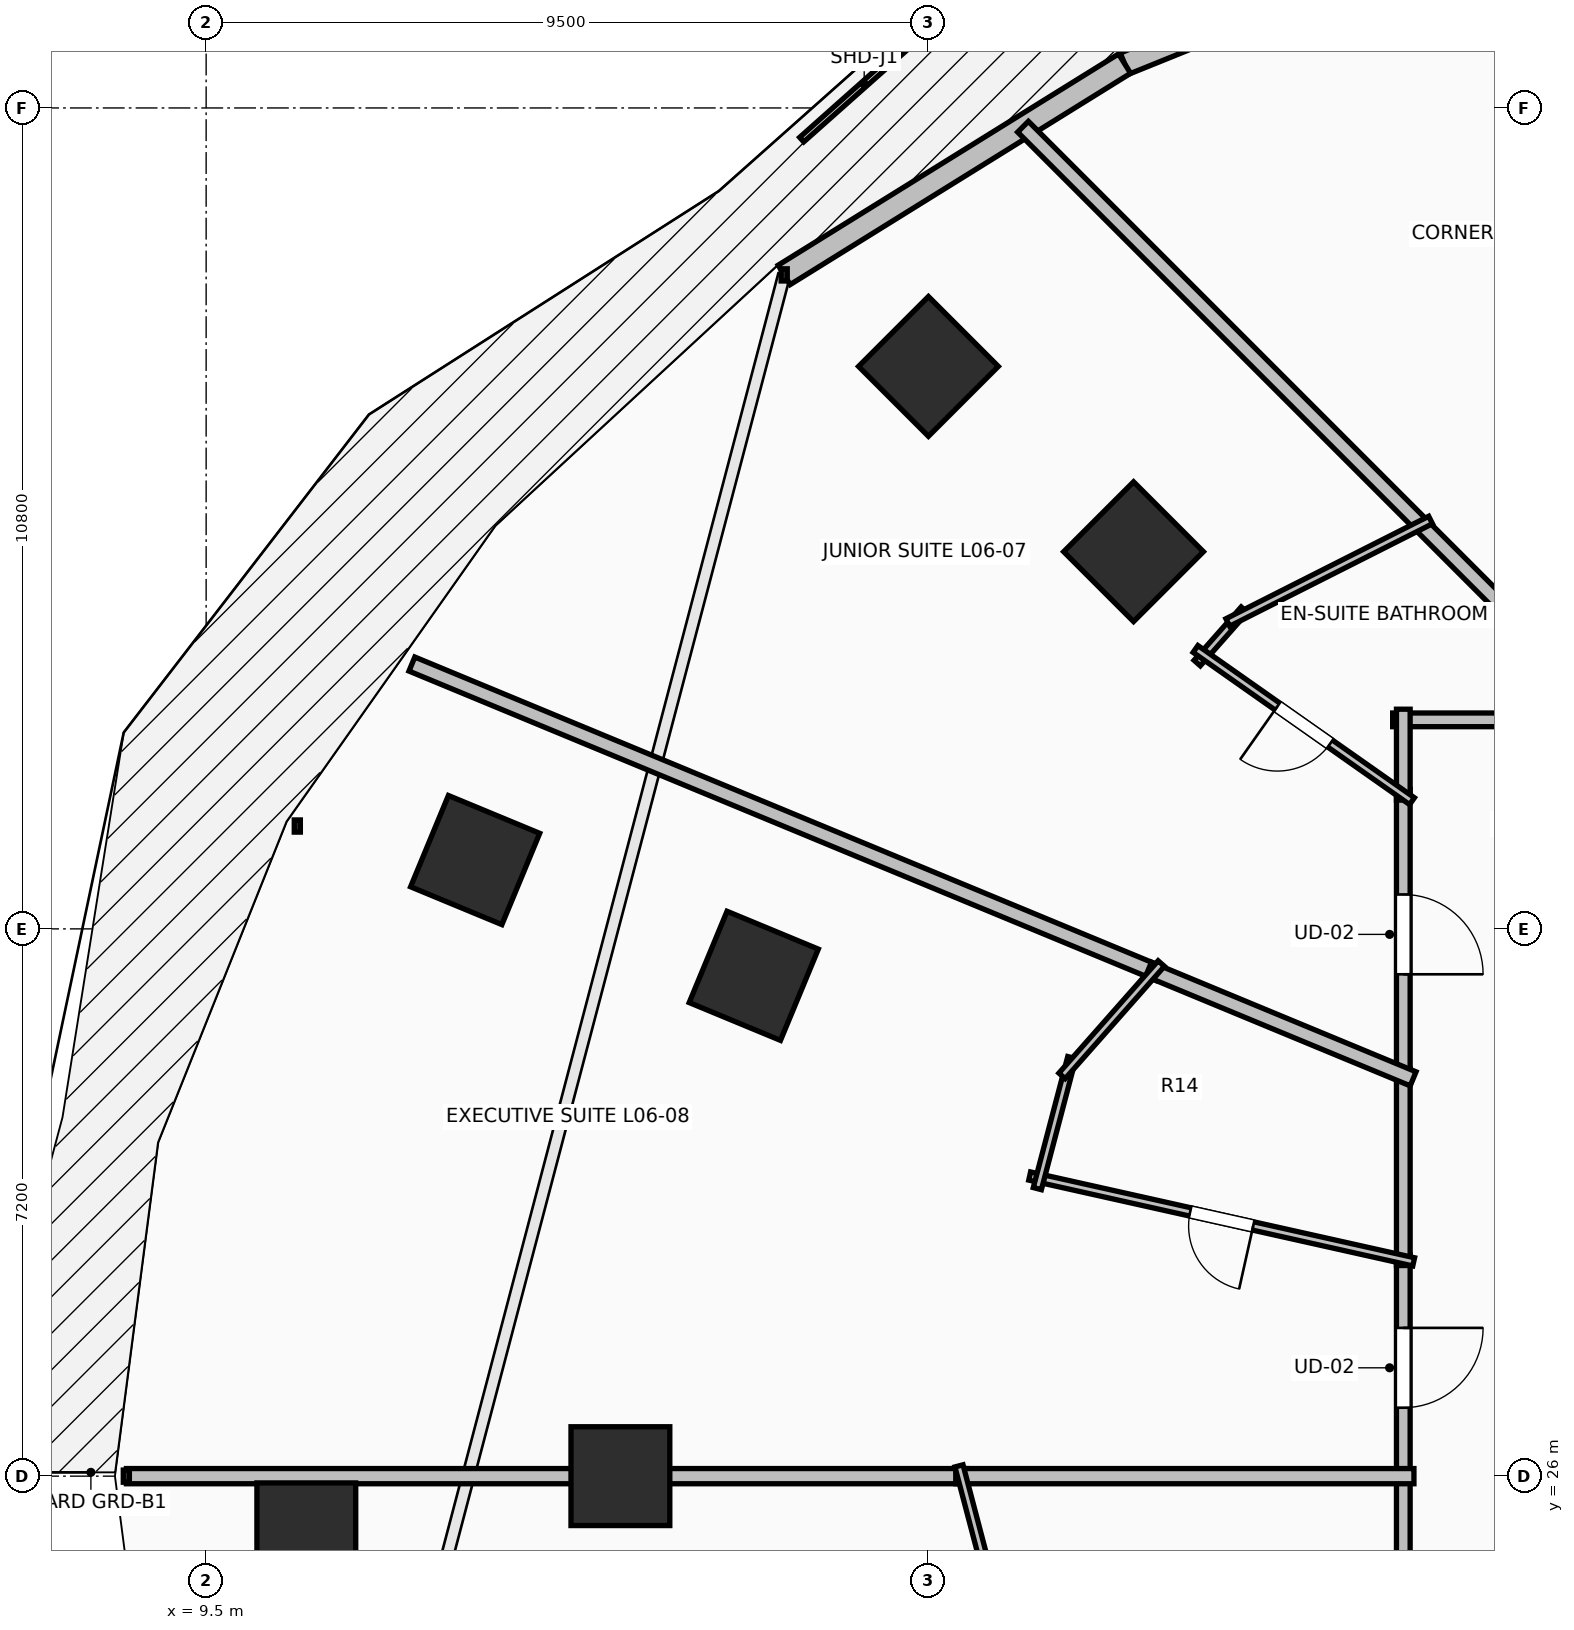
"""IFC4 building model, lengths in metres.
Left out: names, types, materials, properties, quantities, classifications, styles, units other than length and angle.
Written with IfcOpenShell. Run it as: python <this file> out.ifc"""

import sys

from ifc_helpers import new_model, si_unit, direction, frame, frame_2d, origin, origin_2d, place, context, subcontext, project, spatial, rectangle, extrude, element, fill, save


model = new_model("IFC4")
c1 = context("Model", 3, precision=1e-05, world=origin(), true_north=direction((0.0, 1.0)))
c2 = subcontext(c1, "Body", "Model", "MODEL_VIEW")
j1 = project(units=[si_unit("LENGTHUNIT", "METRE"), si_unit("PLANEANGLEUNIT", "RADIAN")], contexts=[c1])
p1 = place(None, origin())
s1 = spatial("IfcSite", under=j1, at=p1, CompositionType="ELEMENT")
p2 = place(p1, origin())
s2 = spatial("IfcBuilding", under=s1, at=p2, CompositionType="ELEMENT")
p3 = place(p2, frame((0.0, 0.0, 27.5)))
s3 = spatial("IfcBuildingStorey", under=s2, at=p3, CompositionType="ELEMENT", Elevation=27.5)
for number, where, z_axis, x_axis in (
    (1, (21.701, 38.162, 0.0), (0.0, 0.0, 1.0), (-0.707, 0.707, 0.0)),
    (2, (16.705, 32.582, 0.0), (0.0, 0.0, 1.0), (-0.924, 0.383, 0.0)),
    (3, (14.95, 26.0, 0.0), (0.0, 0.0, 1.0), (-1.0, 0.0, 0.0)),
    (4, (19.003, 40.6, 0.0), (0.0, 0.0, 1.0), (-0.707, 0.707, 0.0)),
    (5, (13.039, 34.105, 0.0), (0.0, 0.0, 1.0), (-0.924, 0.383, 0.0)),
    (6, (10.818, 25.261, 0.0), (0.0, 0.0, 1.0), (-1.0, 0.0, 0.0)),
):
    element("IfcColumn", number, at=place(p3, frame(where, z_axis=z_axis, x_axis=x_axis)), inside=s3, PredefinedType="COLUMN", context=c2, shape_type="SweptSolid", body=[
        extrude(rectangle(XDim=1.3, YDim=1.3, at=origin_2d()), origin(), (0.0, 0.0, 1.0), 3.5),
    ])
p4 = place(p3, frame((26.692, 46.649, 0.0), z_axis=(0.0, 0.0, 1.0), x_axis=(-0.927095325176, -0.374825636845, 0.0)))
e7 = element("IfcWall", 7, at=p4, inside=s3, PredefinedType="STANDARD", context=c2, shape_type="SweptSolid", body=[
    extrude(rectangle(XDim=5.51, YDim=0.3, at=frame_2d((2.755, 0.0))), origin(), (0.0, 0.0, 1.0), 3.24),
])
p5 = place(p4, frame((1.955, 0.0, 0.0)))
e8 = element("IfcOpeningElement", 8, at=p5, cuts=e7, PredefinedType="OPENING", context=c2, shape_type="SweptSolid", body=[
    extrude(rectangle(XDim=1.6, YDim=2.3, at=frame_2d((0.8, 1.15))), frame((0.0, 0.165, 0.0), z_axis=(0.0, -1.0, 0.0), x_axis=(1.0, 0.0, 0.0)), (0.0, 0.0, 1.0), 0.33),
])
p6 = place(p3, frame((21.583, 44.583, 0.0), z_axis=(0.0, 0.0, 1.0), x_axis=(-0.849633724826, -0.527373239404, 0.0)))
e9 = element("IfcWall", 9, at=p6, inside=s3, PredefinedType="STANDARD", context=c2, shape_type="SweptSolid", body=[
    extrude(rectangle(XDim=5.271, YDim=0.3, at=frame_2d((2.635, 0.0))), origin(), (0.0, 0.0, 1.0), 3.24),
])
p7 = place(p3, frame((25.25, 35.034, 0.0), z_axis=(0.0, 0.0, 1.0), x_axis=(0.0, -1.0, 0.0)))
e10 = element("IfcWall", 10, at=p7, inside=s3, PredefinedType="PARTITIONING", context=c2, shape_type="SweptSolid", body=[
    extrude(rectangle(XDim=3.813, YDim=0.18, at=frame_2d((1.906, 0.0))), origin(), (0.0, 0.0, 1.0), 2.432),
])
p8 = place(p7, frame((1.382, 0.0, 0.0)))
e11 = element("IfcOpeningElement", 11, at=p8, cuts=e10, PredefinedType="OPENING", context=c2, shape_type="SweptSolid", body=[
    extrude(rectangle(XDim=1.05, YDim=2.2, at=frame_2d((0.525, 1.1))), frame((0.0, 0.105, 0.0), z_axis=(0.0, -1.0, 0.0), x_axis=(1.0, 0.0, 0.0)), (0.0, 0.0, 1.0), 0.21),
])
p9 = place(p3, frame((28.105, 35.95, 0.0), z_axis=(0.0, 0.0, 1.0), x_axis=(-1.0, 0.0, 0.0)))
e12 = element("IfcWall", 12, at=p9, inside=s3, PredefinedType="PARTITIONING", context=c2, shape_type="SweptSolid", body=[
    extrude(rectangle(XDim=2.995, YDim=0.18, at=frame_2d((1.498, 0.0))), origin(), (0.0, 0.0, 1.0), 2.432),
])
p10 = place(p3, frame((25.25, 36.09, 0.0), z_axis=(0.0, 0.0, 1.0), x_axis=(0.0, -1.0, 0.0)))
e13 = element("IfcWall", 13, at=p10, inside=s3, PredefinedType="PARTITIONING", context=c2, shape_type="SweptSolid", body=[
    extrude(rectangle(XDim=1.196, YDim=0.18, at=frame_2d((0.598, 0.0))), origin(), (0.0, 0.0, 1.0), 2.432),
])
p11 = place(p3, frame((25.25, 28.911, 0.0), z_axis=(0.0, 0.0, 1.0), x_axis=(0.0, -1.0, 0.0)))
e14 = element("IfcWall", 14, at=p11, inside=s3, PredefinedType="PARTITIONING", context=c2, shape_type="SweptSolid", body=[
    extrude(rectangle(XDim=2.971, YDim=0.18, at=frame_2d((1.485, 0.0))), origin(), (0.0, 0.0, 1.0), 2.432),
])
p12 = place(p11, frame((0.96, 0.0, 0.0)))
e15 = element("IfcOpeningElement", 15, at=p12, cuts=e14, PredefinedType="OPENING", context=c2, shape_type="SweptSolid", body=[
    extrude(rectangle(XDim=1.05, YDim=2.2, at=frame_2d((0.525, 1.1))), frame((0.0, 0.105, 0.0), z_axis=(0.0, -1.0, 0.0), x_axis=(1.0, 0.0, 0.0)), (0.0, 0.0, 1.0), 0.21),
])
p13 = place(p3, frame((25.25, 31.361, 0.0), z_axis=(0.0, 0.0, 1.0), x_axis=(0.0, -1.0, 0.0)))
e16 = element("IfcWall", 16, at=p13, inside=s3, PredefinedType="PARTITIONING", context=c2, shape_type="SweptSolid", body=[
    extrude(rectangle(XDim=2.59, YDim=0.18, at=frame_2d((1.295, 0.0))), origin(), (0.0, 0.0, 1.0), 2.432),
])
p14 = place(p3, frame((25.25, 26.08, 0.0), z_axis=(0.0, 0.0, 1.0), x_axis=(0.0, -1.0, 0.0)))
e17 = element("IfcWall", 17, at=p14, inside=s3, PredefinedType="PARTITIONING", context=c2, shape_type="SweptSolid", body=[
    extrude(rectangle(XDim=2.385, YDim=0.18, at=frame_2d((1.192, 0.0))), origin(), (0.0, 0.0, 1.0), 3.24),
])
p15 = place(p3, frame((20.247, 43.753, 0.0), z_axis=(0.0, 0.0, 1.0), x_axis=(0.707106781187, -0.707106781187, 0.0)))
e18 = element("IfcWall", 18, at=p15, inside=s3, PredefinedType="PARTITIONING", context=c2, shape_type="SweptSolid", body=[
    extrude(rectangle(XDim=11.035, YDim=0.2, at=frame_2d((5.518, 0.0))), origin(), (0.0, 0.0, 1.0), 2.432),
])
p16 = place(p3, frame((22.538, 36.697, 0.0), z_axis=(0.0, 0.0, 1.0), x_axis=(0.662242037053, 0.749289986827, 0.0)))
e19 = element("IfcWall", 19, at=p16, inside=s3, PredefinedType="PARTITIONING", context=c2, shape_type="SweptSolid", body=[
    extrude(rectangle(XDim=0.937, YDim=0.11, at=frame_2d((0.468, 0.0))), origin(), (0.0, 0.0, 1.0), 2.432),
])
p17 = place(p3, frame((22.941, 37.231, 0.0), z_axis=(0.0, 0.0, 1.0), x_axis=(0.892507731149, 0.451032094024, 0.0)))
e20 = element("IfcWall", 20, at=p17, inside=s3, PredefinedType="PARTITIONING", context=c2, shape_type="SweptSolid", body=[
    extrude(rectangle(XDim=2.989, YDim=0.11, at=frame_2d((1.495, 0.0))), origin(), (0.0, 0.0, 1.0), 2.432),
])
p18 = place(p3, frame((25.365, 34.881, 0.0), z_axis=(0.0, 0.0, 1.0), x_axis=(-0.81809360258, 0.575085087111, 0.0)))
e21 = element("IfcWall", 21, at=p18, inside=s3, PredefinedType="PARTITIONING", context=c2, shape_type="SweptSolid", body=[
    extrude(rectangle(XDim=3.481, YDim=0.11, at=frame_2d((1.741, 0.0))), origin(), (0.0, 0.0, 1.0), 2.432),
])
p19 = place(p18, frame((1.316, 0.0, 0.0)))
e22 = element("IfcOpeningElement", 22, at=p19, cuts=e21, PredefinedType="OPENING", context=c2, shape_type="SweptSolid", body=[
    extrude(rectangle(XDim=0.85, YDim=2.1, at=frame_2d((0.425, 1.05))), frame((0.0, 0.07, 0.0), z_axis=(0.0, -1.0, 0.0), x_axis=(1.0, 0.0, 0.0)), (0.0, 0.0, 1.0), 0.14),
])
p20 = place(p3, frame((12.207, 36.684, 0.0), z_axis=(0.0, 0.0, 1.0), x_axis=(0.923876032578, -0.382691881842, 0.0)))
e23 = element("IfcWall", 23, at=p20, inside=s3, PredefinedType="PARTITIONING", context=c2, shape_type="SweptSolid", body=[
    extrude(rectangle(XDim=10.63, YDim=0.2, at=frame_2d((5.315, 0.0))), origin(), (0.0, 0.0, 1.0), 2.624),
])
p21 = place(p3, frame((21.899, 32.669, 0.0), z_axis=(0.0, 0.0, 1.0), x_axis=(0.923843852071, -0.382769561211, 0.0)))
e24 = element("IfcWall", 24, at=p21, inside=s3, PredefinedType="PARTITIONING", context=c2, shape_type="SweptSolid", body=[
    extrude(rectangle(XDim=3.768, YDim=0.2, at=frame_2d((1.884, 0.0))), origin(), (0.0, 0.0, 1.0), 2.922),
])
p22 = place(p3, frame((25.387, 28.82, 0.0), z_axis=(0.0, 0.0, 1.0), x_axis=(-0.975933395621, 0.218068813248, 0.0)))
e25 = element("IfcWall", 25, at=p22, inside=s3, PredefinedType="PARTITIONING", context=c2, shape_type="SweptSolid", body=[
    extrude(rectangle(XDim=5.177, YDim=0.11, at=frame_2d((2.588, 0.0))), origin(), (0.0, 0.0, 1.0), 2.432),
])
p23 = place(p22, frame((2.163, 0.0, 0.0)))
e26 = element("IfcOpeningElement", 26, at=p23, cuts=e25, PredefinedType="OPENING", context=c2, shape_type="SweptSolid", body=[
    extrude(rectangle(XDim=0.85, YDim=2.1, at=frame_2d((0.425, 1.05))), frame((0.0, 0.07, 0.0), z_axis=(0.0, -1.0, 0.0), x_axis=(1.0, 0.0, 0.0)), (0.0, 0.0, 1.0), 0.14),
])
p24 = place(p3, frame((20.435, 29.783, 0.0), z_axis=(0.0, 0.0, 1.0), x_axis=(0.254378671262, 0.967104695267, 0.0)))
e27 = element("IfcWall", 27, at=p24, inside=s3, PredefinedType="PARTITIONING", context=c2, shape_type="SweptSolid", body=[
    extrude(rectangle(XDim=1.782, YDim=0.11, at=frame_2d((0.891, 0.0))), origin(), (0.0, 0.0, 1.0), 2.432),
])
p25 = place(p3, frame((20.76, 31.266, 0.0), z_axis=(0.0, 0.0, 1.0), x_axis=(0.662047420969, 0.749461948593, 0.0)))
e28 = element("IfcWall", 28, at=p25, inside=s3, PredefinedType="PARTITIONING", context=c2, shape_type="SweptSolid", body=[
    extrude(rectangle(XDim=1.972, YDim=0.11, at=frame_2d((0.986, 0.0))), origin(), (0.0, 0.0, 1.0), 3.24),
])
p26 = place(p3, frame((8.451, 26.0, 0.0), z_axis=(0.0, 0.0, 1.0), x_axis=(1.0, 0.0, 0.0)))
e29 = element("IfcWall", 29, at=p26, inside=s3, PredefinedType="PARTITIONING", context=c2, shape_type="SweptSolid", body=[
    extrude(rectangle(XDim=11.051, YDim=0.2, at=frame_2d((5.525, 0.0))), origin(), (0.0, 0.0, 1.0), 2.432),
])
p27 = place(p3, frame((19.362, 26.0, 0.0), z_axis=(0.0, 0.0, 1.0), x_axis=(1.0, 0.0, 0.0)))
e30 = element("IfcWall", 30, at=p27, inside=s3, PredefinedType="PARTITIONING", context=c2, shape_type="SweptSolid", body=[
    extrude(rectangle(XDim=6.028, YDim=0.2, at=frame_2d((3.014, 0.0))), origin(), (0.0, 0.0, 1.0), 2.922),
])
p28 = place(p3, frame((20.291, 22.768, 0.0), z_axis=(0.0, 0.0, 1.0), x_axis=(-0.254476045764, 0.967079077497, 0.0)))
e31 = element("IfcWall", 31, at=p28, inside=s3, PredefinedType="PARTITIONING", context=c2, shape_type="SweptSolid", body=[
    extrude(rectangle(XDim=3.483, YDim=0.11, at=frame_2d((1.741, 0.0))), origin(), (0.0, 0.0, 1.0), 3.24),
])
p29 = place(p8, origin())
e32 = element("IfcDoor", 32, at=p29, inside=s3, OperationType="SINGLE_SWING_RIGHT", PredefinedType="DOOR", context=c2, shape_type="SweptSolid", body=[
    extrude(rectangle(XDim=1.05, YDim=2.2, at=frame_2d((0.525, 1.1))), frame((0.0, 0.025, 0.0), z_axis=(0.0, -1.0, 0.0), x_axis=(1.0, 0.0, 0.0)), (0.0, 0.0, 1.0), 0.05),
])
fill(e11, e32)
p30 = place(p12, origin())
e33 = element("IfcDoor", 33, at=p30, inside=s3, OperationType="SINGLE_SWING_LEFT", PredefinedType="DOOR", context=c2, shape_type="SweptSolid", body=[
    extrude(rectangle(XDim=1.05, YDim=2.2, at=frame_2d((0.525, 1.1))), frame((0.0, 0.025, 0.0), z_axis=(0.0, -1.0, 0.0), x_axis=(1.0, 0.0, 0.0)), (0.0, 0.0, 1.0), 0.05),
])
fill(e15, e33)
p31 = place(p19, origin())
e34 = element("IfcDoor", 34, at=p31, inside=s3, OperationType="SINGLE_SWING_RIGHT", PredefinedType="DOOR", context=c2, shape_type="SweptSolid", body=[
    extrude(rectangle(XDim=0.85, YDim=2.1, at=frame_2d((0.425, 1.05))), frame((0.0, 0.025, 0.0), z_axis=(0.0, -1.0, 0.0), x_axis=(1.0, 0.0, 0.0)), (0.0, 0.0, 1.0), 0.05),
])
fill(e22, e34)
p32 = place(p23, origin())
e35 = element("IfcDoor", 35, at=p32, inside=s3, OperationType="SINGLE_SWING_LEFT", PredefinedType="DOOR", context=c2, shape_type="SweptSolid", body=[
    extrude(rectangle(XDim=0.85, YDim=2.1, at=frame_2d((0.425, 1.05))), frame((0.0, 0.025, 0.0), z_axis=(0.0, -1.0, 0.0), x_axis=(1.0, 0.0, 0.0)), (0.0, 0.0, 1.0), 0.05),
])
fill(e26, e35)
save(model, sys.argv[1])
